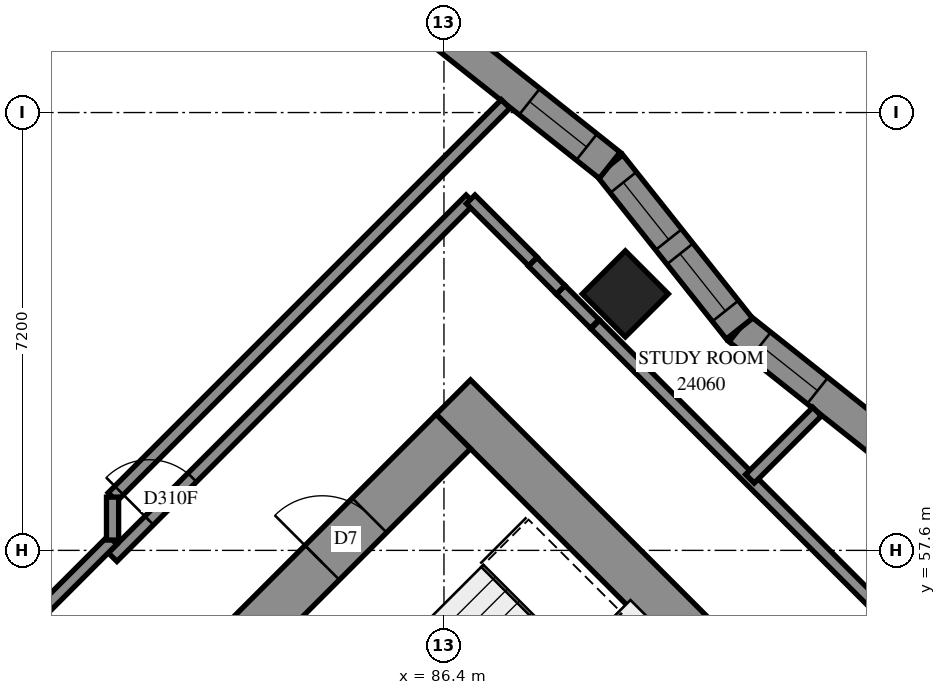
"""IFC4 building model, lengths in metres.
Left out: names, types, materials, properties, quantities, classifications, styles, units other than length and angle.
Written with IfcOpenShell. Run it as: python <this file> out.ifc"""

import sys

from ifc_helpers import new_model, si_unit, direction, frame, frame_2d, origin, origin_2d, place, context, subcontext, project, spatial, polyline, rectangle, outline, extrude, element, fill, save


model = new_model("IFC4")
c1 = context("Model", 3, precision=1e-05, world=origin(), true_north=direction((0.0, 1.0)))
c2 = subcontext(c1, "Body", "Model", "MODEL_VIEW")
j1 = project(units=[si_unit("LENGTHUNIT", "METRE"), si_unit("PLANEANGLEUNIT", "RADIAN")], contexts=[c1])
p1 = place(None, origin())
s1 = spatial("IfcSite", under=j1, at=p1, CompositionType="ELEMENT")
p2 = place(p1, origin())
s2 = spatial("IfcBuilding", under=s1, at=p2, CompositionType="ELEMENT")
p3 = place(p2, frame((0.0, 0.0, 91.4)))
s3 = spatial("IfcBuildingStorey", under=s2, at=p3, CompositionType="ELEMENT", Elevation=91.4)
p4 = place(p3, frame((89.382, 61.818, 0.0), z_axis=(0.0, 0.0, 1.0), x_axis=(0.7071067812, -0.7071067812, 0.0)))
e1 = element("IfcColumn", 1, at=p4, inside=s3, PredefinedType="COLUMN", context=c2, shape_type="SweptSolid", body=[
    extrude(rectangle(XDim=1.0, YDim=1.0, at=origin_2d()), origin(), (0.0, 0.0, 1.0), 3.1),
])
p5 = place(p3, frame((86.554, 60.121, -0.3), z_axis=(0.0, 0.0, 1.0), x_axis=(0.7071067812, -0.7071067812, 0.0)))
e2 = element("IfcWall", 2, at=p5, inside=s3, PredefinedType="SHEAR", context=c2, shape_type="SweptSolid", body=[
    extrude(rectangle(XDim=16.0, YDim=0.8, at=frame_2d((8.0, 0.0))), origin(), (0.0, 0.0, 1.0), 2.7),
])
p6 = place(p5, frame((10.8, 0.0, 0.3)))
e3 = element("IfcOpeningElement", 3, at=p6, cuts=e2, PredefinedType="OPENING", context=c2, shape_type="SweptSolid", body=[
    extrude(rectangle(XDim=0.8, YDim=2.1, at=frame_2d((0.4, 1.05))), frame((0.0, 0.41, 0.0), z_axis=(0.0, -1.0, 0.0), x_axis=(1.0, 0.0, 0.0)), (0.0, 0.0, 1.0), 0.82),
])
p7 = place(p3, frame((76.372, 49.373, -0.3), z_axis=(0.0, 0.0, 1.0), x_axis=(0.7071067812, 0.7071067812, 0.0)))
e4 = element("IfcWall", 4, at=p7, inside=s3, PredefinedType="SHEAR", context=c2, shape_type="SweptSolid", body=[
    extrude(rectangle(XDim=14.4, YDim=0.8, at=frame_2d((7.2, 0.0))), origin(), (0.0, 0.0, 1.0), 2.7),
])
p8 = place(p7, frame((4.55, 0.0, 0.3)))
e5 = element("IfcOpeningElement", 5, at=p8, cuts=e4, PredefinedType="OPENING", context=c2, shape_type="SweptSolid", body=[
    extrude(rectangle(XDim=1.1, YDim=2.1, at=frame_2d((0.55, 1.05))), frame((0.0, 0.41, 0.0), z_axis=(0.0, -1.0, 0.0), x_axis=(1.0, 0.0, 0.0)), (0.0, 0.0, 1.0), 0.82),
])
p9 = place(p7, frame((11.35, 0.0, 0.3)))
e6 = element("IfcOpeningElement", 6, at=p9, cuts=e4, PredefinedType="OPENING", context=c2, shape_type="SweptSolid", body=[
    extrude(rectangle(XDim=1.1, YDim=2.1, at=frame_2d((0.55, 1.05))), frame((0.0, 0.41, 0.0), z_axis=(0.0, -1.0, 0.0), x_axis=(1.0, 0.0, 0.0)), (0.0, 0.0, 1.0), 0.82),
])
p10 = place(p3, frame((93.945, 59.113, 0.0), z_axis=(0.0, 0.0, 1.0), x_axis=(-0.7830966489, 0.621900023, 0.0)))
e7 = element("IfcWall", 7, at=p10, inside=s3, PredefinedType="SOLIDWALL", context=c2, shape_type="SweptSolid", body=[
    extrude(outline(polyline([(-0.032, -0.275), (3.398, -0.275), (3.462, 0.275), (0.032, 0.275), (-0.032, -0.275)])), origin(), (0.0, 0.0, 1.0), 3.1),
])
p11 = place(p10, frame((1.789, 0.0, 0.5)))
e8 = element("IfcOpeningElement", 8, at=p11, cuts=e7, PredefinedType="OPENING", context=c2, shape_type="SweptSolid", body=[
    extrude(rectangle(XDim=1.2, YDim=2.45, at=frame_2d((0.6, 1.225))), frame((0.0, 0.285, 0.0), z_axis=(0.0, -1.0, 0.0), x_axis=(1.0, 0.0, 0.0)), (0.0, 0.0, 1.0), 0.57),
])
p12 = place(p3, frame((91.259, 61.246, 0.0), z_axis=(0.0, 0.0, 1.0), x_axis=(-0.6218858246, 0.7831079243, 0.0)))
e9 = element("IfcWall", 9, at=p12, inside=s3, PredefinedType="SOLIDWALL", context=c2, shape_type="SweptSolid", body=[
    extrude(outline(polyline([(0.032, -0.275), (3.462, -0.275), (3.398, 0.275), (-0.032, 0.275), (0.032, -0.275)])), origin(), (0.0, 0.0, 1.0), 3.1),
])
p13 = place(p12, frame((0.371, 0.0, 0.5)))
e10 = element("IfcOpeningElement", 10, at=p13, cuts=e9, PredefinedType="OPENING", context=c2, shape_type="SweptSolid", body=[
    extrude(rectangle(XDim=1.2, YDim=2.45, at=frame_2d((0.6, 1.225))), frame((0.0, 0.285, 0.0), z_axis=(0.0, -1.0, 0.0), x_axis=(1.0, 0.0, 0.0)), (0.0, 0.0, 1.0), 0.57),
])
p14 = place(p12, frame((1.87, 0.0, 0.5)))
e11 = element("IfcOpeningElement", 11, at=p14, cuts=e9, PredefinedType="OPENING", context=c2, shape_type="SweptSolid", body=[
    extrude(rectangle(XDim=1.2, YDim=2.45, at=frame_2d((0.6, 1.225))), frame((0.0, 0.285, 0.0), z_axis=(0.0, -1.0, 0.0), x_axis=(1.0, 0.0, 0.0)), (0.0, 0.0, 1.0), 0.57),
])
p15 = place(p3, frame((89.126, 63.933, 0.0), z_axis=(0.0, 0.0, 1.0), x_axis=(-0.7831079243, 0.6218858246, 0.0)))
e12 = element("IfcWall", 12, at=p15, inside=s3, PredefinedType="SOLIDWALL", context=c2, shape_type="SweptSolid", body=[
    extrude(outline(polyline([(-0.032, -0.275), (3.398, -0.275), (3.462, 0.275), (0.032, 0.275), (-0.032, -0.275)])), origin(), (0.0, 0.0, 1.0), 3.1),
])
p16 = place(p15, frame((0.484, 0.0, 0.5)))
e13 = element("IfcOpeningElement", 13, at=p16, cuts=e12, PredefinedType="OPENING", context=c2, shape_type="SweptSolid", body=[
    extrude(rectangle(XDim=1.2, YDim=2.45, at=frame_2d((0.6, 1.225))), frame((0.0, 0.285, 0.0), z_axis=(0.0, -1.0, 0.0), x_axis=(1.0, 0.0, 0.0)), (0.0, 0.0, 1.0), 0.57),
])
p17 = place(p3, frame((80.949, 58.477, 0.0), z_axis=(0.0, 0.0, 1.0), x_axis=(0.7071122504, 0.707101312, 0.0)))
e14 = element("IfcWall", 14, at=p17, inside=s3, PredefinedType="PARTITIONING", context=c2, shape_type="SweptSolid", body=[
    extrude(rectangle(XDim=9.142, YDim=0.2, at=frame_2d((4.571, 0.0))), origin(), (0.0, 0.0, 1.0), 3.1),
])
p18 = place(p3, frame((80.951, 57.489, 0.0), z_axis=(0.0, 0.0, 1.0), x_axis=(0.7071067812, 0.7071067812, 0.0)))
e15 = element("IfcWall", 15, at=p18, inside=s3, PredefinedType="PARTITIONING", context=c2, shape_type="SweptSolid", body=[
    extrude(rectangle(XDim=8.321, YDim=0.2, at=frame_2d((4.161, 0.0))), origin(), (0.0, 0.0, 1.0), 3.1),
])
p19 = place(p18, frame((0.851, 0.0, 0.0)))
e16 = element("IfcOpeningElement", 16, at=p19, cuts=e15, PredefinedType="OPENING", context=c2, shape_type="SweptSolid", body=[
    extrude(rectangle(XDim=1.0, YDim=2.1, at=frame_2d((0.5, 1.05))), frame((0.0, 0.11, 0.0), z_axis=(0.0, -1.0, 0.0), x_axis=(1.0, 0.0, 0.0)), (0.0, 0.0, 1.0), 0.22),
])
p20 = place(p3, frame((88.889, 61.315, 0.0), z_axis=(0.0, 0.0, 1.0), x_axis=(0.7071067812, -0.7071067812, 0.0)))
e17 = element("IfcWall", 17, at=p20, inside=s3, PredefinedType="PARTITIONING", context=c2, shape_type="SweptSolid", body=[
    extrude(rectangle(XDim=7.187, YDim=0.2, at=frame_2d((3.594, 0.0))), origin(), (0.0, 0.0, 1.0), 3.1),
])
p21 = place(p3, frame((79.802, 56.623, 0.0), z_axis=(0.0, 0.0, 1.0), x_axis=(0.7071067812, 0.7071067812, 0.0)))
e18 = element("IfcWall", 18, at=p21, inside=s3, PredefinedType="PARTITIONING", context=c2, shape_type="SweptSolid", body=[
    extrude(rectangle(XDim=1.623, YDim=0.2, at=frame_2d((0.812, 0.0))), origin(), (0.0, 0.0, 1.0), 3.1),
])
p22 = place(p3, frame((91.432, 58.778, 0.0), z_axis=(0.0, 0.0, 1.0), x_axis=(0.7071067812, 0.7071067812, 0.0)))
e19 = element("IfcWall", 19, at=p22, inside=s3, PredefinedType="PARTITIONING", context=c2, shape_type="SweptSolid", body=[
    extrude(rectangle(XDim=1.561, YDim=0.2, at=frame_2d((0.78, 0.0))), origin(), (0.0, 0.0, 1.0), 3.1),
])
p23 = place(p3, frame((86.839, 63.373, 0.0), z_axis=(0.0, 0.0, 1.0), x_axis=(0.7077963046, -0.7064165847, 0.0)))
e20 = element("IfcWall", 20, at=p23, inside=s3, PredefinedType="PARTITIONING", context=c2, shape_type="SweptSolid", body=[
    extrude(rectangle(XDim=1.45, YDim=0.2, at=frame_2d((0.725, 0.0))), origin(), (0.0, 0.0, 1.0), 3.1),
])
p24 = place(p3, frame((88.319, 61.885, 0.0), z_axis=(0.0, 0.0, 1.0), x_axis=(0.7071067812, -0.7071067812, 0.0)))
e21 = element("IfcWall", 21, at=p24, inside=s3, PredefinedType="PARTITIONING", context=c2, shape_type="SweptSolid", body=[
    extrude(rectangle(XDim=0.792, YDim=0.2, at=frame_2d((0.396, 0.0))), origin(), (0.0, 0.0, 1.0), 3.1),
])
p25 = place(p3, frame((80.95, 57.77, 0.0), z_axis=(0.0, 0.0, 1.0), x_axis=(0.0, 1.0, 0.0)))
e22 = element("IfcWall", 22, at=p25, inside=s3, PredefinedType="PARTITIONING", context=c2, shape_type="SweptSolid", body=[
    extrude(rectangle(XDim=0.706, YDim=0.2, at=frame_2d((0.353, 0.0))), origin(), (0.0, 0.0, 1.0), 3.1),
])
p26 = place(p3, frame((87.861, 62.344, 0.0), z_axis=(0.0, 0.0, 1.0), x_axis=(0.7055645691, -0.708645637, 0.0)))
e23 = element("IfcWall", 23, at=p26, inside=s3, PredefinedType="PARTITIONING", context=c2, shape_type="SweptSolid", body=[
    extrude(rectangle(XDim=0.649, YDim=0.2, at=frame_2d((0.325, 0.0))), origin(), (0.0, 0.0, 1.0), 3.1),
])
p27 = place(p11, origin())
e24 = element("IfcWindow", 24, at=p27, inside=s3, PartitioningType="SINGLE_PANEL", PredefinedType="WINDOW", context=c2, shape_type="SweptSolid", body=[
    extrude(rectangle(XDim=1.2, YDim=2.45, at=frame_2d((0.6, 1.225))), frame((0.0, 0.155, 0.0), z_axis=(0.0, -1.0, 0.0), x_axis=(1.0, 0.0, 0.0)), (0.0, 0.0, 1.0), 0.06),
])
fill(e8, e24)
p28 = place(p13, origin())
e25 = element("IfcWindow", 25, at=p28, inside=s3, PartitioningType="SINGLE_PANEL", PredefinedType="WINDOW", context=c2, shape_type="SweptSolid", body=[
    extrude(rectangle(XDim=1.2, YDim=2.45, at=frame_2d((0.6, 1.225))), frame((0.0, 0.155, 0.0), z_axis=(0.0, -1.0, 0.0), x_axis=(1.0, 0.0, 0.0)), (0.0, 0.0, 1.0), 0.06),
])
fill(e10, e25)
p29 = place(p14, origin())
e26 = element("IfcWindow", 26, at=p29, inside=s3, PartitioningType="SINGLE_PANEL", PredefinedType="WINDOW", context=c2, shape_type="SweptSolid", body=[
    extrude(rectangle(XDim=1.2, YDim=2.45, at=frame_2d((0.6, 1.225))), frame((0.0, 0.155, 0.0), z_axis=(0.0, -1.0, 0.0), x_axis=(1.0, 0.0, 0.0)), (0.0, 0.0, 1.0), 0.06),
])
fill(e11, e26)
p30 = place(p16, origin())
e27 = element("IfcWindow", 27, at=p30, inside=s3, PartitioningType="SINGLE_PANEL", PredefinedType="WINDOW", context=c2, shape_type="SweptSolid", body=[
    extrude(rectangle(XDim=1.2, YDim=2.45, at=frame_2d((0.6, 1.225))), frame((0.0, 0.155, 0.0), z_axis=(0.0, -1.0, 0.0), x_axis=(1.0, 0.0, 0.0)), (0.0, 0.0, 1.0), 0.06),
])
fill(e13, e27)
p31 = place(p9, origin())
e28 = element("IfcDoor", 28, at=p31, inside=s3, OperationType="SINGLE_SWING_LEFT", PredefinedType="DOOR", context=c2, shape_type="SweptSolid", body=[
    extrude(rectangle(XDim=1.1, YDim=2.1, at=frame_2d((0.55, 1.05))), frame((0.0, 0.025, 0.0), z_axis=(0.0, -1.0, 0.0), x_axis=(1.0, 0.0, 0.0)), (0.0, 0.0, 1.0), 0.05),
])
fill(e6, e28)
p32 = place(p19, origin())
e29 = element("IfcDoor", 29, at=p32, inside=s3, OperationType="SINGLE_SWING_RIGHT", PredefinedType="DOOR", context=c2, shape_type="SweptSolid", body=[
    extrude(rectangle(XDim=1.0, YDim=2.1, at=frame_2d((0.5, 1.05))), frame((0.0, 0.025, 0.0), z_axis=(0.0, -1.0, 0.0), x_axis=(1.0, 0.0, 0.0)), (0.0, 0.0, 1.0), 0.05),
])
fill(e16, e29)
save(model, sys.argv[1])
